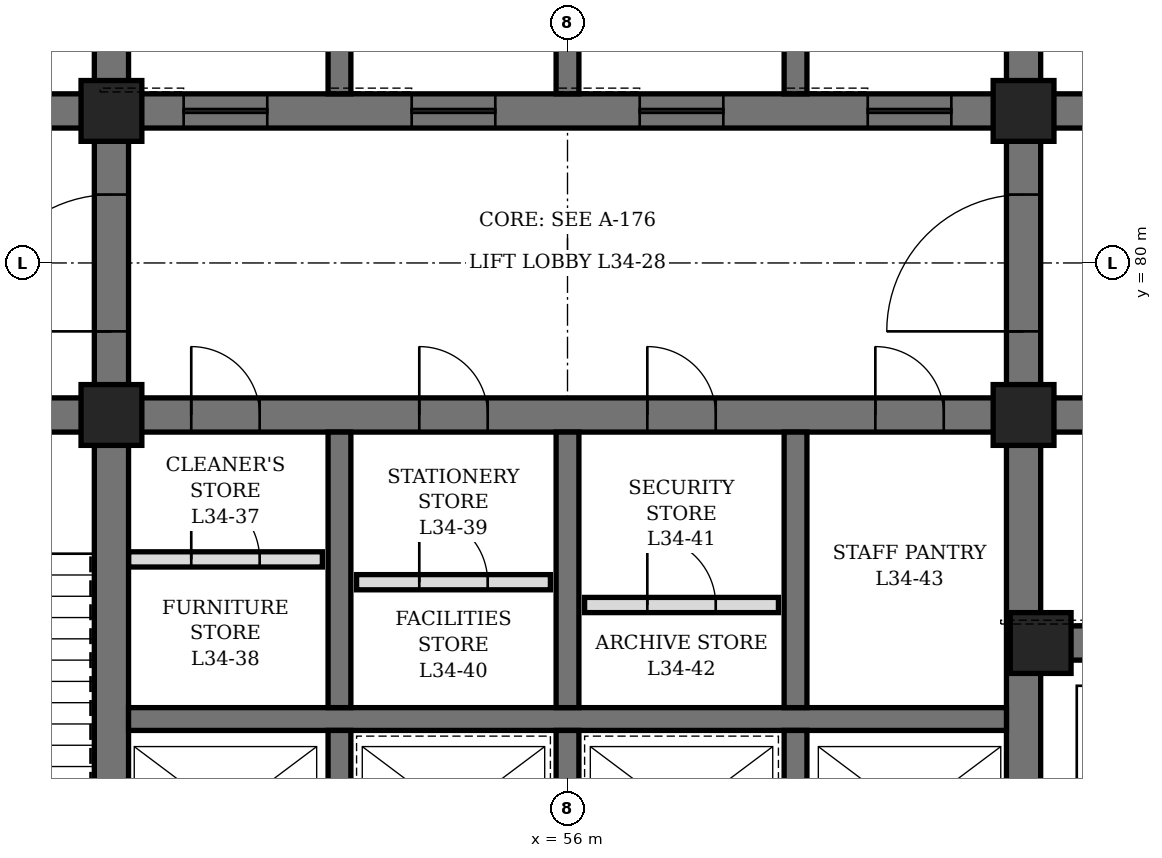
"""IFC4 building model, lengths in metres.
Left out: names, types, materials, properties, quantities, classifications, styles, units other than length and angle.
Written with IfcOpenShell. Run it as: python <this file> out.ifc"""

import sys

from ifc_helpers import new_model, si_unit, direction, frame, frame_2d, origin, origin_2d, place, context, subcontext, project, spatial, rectangle, hollow_rectangle, extrude, element, fill, save


model = new_model("IFC4")
c1 = context("Model", 3, precision=1e-05, world=origin(), true_north=direction((0.0, 1.0)))
c2 = subcontext(c1, "Body", "Model", "MODEL_VIEW")
j1 = project(units=[si_unit("LENGTHUNIT", "METRE"), si_unit("PLANEANGLEUNIT", "RADIAN")], contexts=[c1])
p1 = place(None, origin())
s1 = spatial("IfcSite", under=j1, at=p1, CompositionType="ELEMENT")
p2 = place(p1, origin())
s2 = spatial("IfcBuilding", under=s1, at=p2, CompositionType="ELEMENT")
p3 = place(p2, frame((0.0, 0.0, 154.3)))
s3 = spatial("IfcBuildingStorey", under=s2, at=p3, CompositionType="ELEMENT", Elevation=154.3)
p4 = place(p3, frame((50.0, 71.6, 0.0), z_axis=(0.0, 0.0, 1.0), x_axis=(0.0, 1.0, 0.0)))
e1 = element("IfcWall", 1, at=p4, inside=s3, PredefinedType="SHEAR", context=c2, shape_type="SweptSolid", body=[
    extrude(rectangle(XDim=16.8, YDim=0.45, at=frame_2d((8.4, 0.0))), origin(), (0.0, 0.0, 1.0), 4.2),
])
p5 = place(p4, frame((7.5, 0.0, 0.0)))
e2 = element("IfcOpeningElement", 2, at=p5, cuts=e1, PredefinedType="OPENING", context=c2, shape_type="SweptSolid", body=[
    extrude(rectangle(XDim=1.8, YDim=2.4, at=frame_2d((0.9, 1.2))), frame((0.0, 0.235, 0.0), z_axis=(0.0, -1.0, 0.0), x_axis=(1.0, 0.0, 0.0)), (0.0, 0.0, 1.0), 0.47),
])
p6 = place(p3, frame((62.0, 71.6, 0.0), z_axis=(0.0, 0.0, 1.0), x_axis=(0.0, 1.0, 0.0)))
e3 = element("IfcWall", 3, at=p6, inside=s3, PredefinedType="SHEAR", context=c2, shape_type="SweptSolid", body=[
    extrude(rectangle(XDim=16.8, YDim=0.45, at=frame_2d((8.4, 0.0))), origin(), (0.0, 0.0, 1.0), 4.2),
])
p7 = place(p6, frame((7.5, 0.0, 0.0)))
e4 = element("IfcOpeningElement", 4, at=p7, cuts=e3, PredefinedType="OPENING", context=c2, shape_type="SweptSolid", body=[
    extrude(rectangle(XDim=1.8, YDim=2.4, at=frame_2d((0.9, 1.2))), frame((0.0, 0.235, 0.0), z_axis=(0.0, -1.0, 0.0), x_axis=(1.0, 0.0, 0.0)), (0.0, 0.0, 1.0), 0.47),
])
p8 = place(p3, frame((44.6, 78.0, 0.0), z_axis=(0.0, 0.0, 1.0), x_axis=(1.0, 0.0, 0.0)))
e5 = element("IfcWall", 5, at=p8, inside=s3, PredefinedType="SHEAR", context=c2, shape_type="SweptSolid", body=[
    extrude(rectangle(XDim=5.175, YDim=0.45, at=frame_2d((2.587, 0.0))), origin(), (0.0, 0.0, 1.0), 4.2),
])
p9 = place(p8, frame((1.8, 0.0, 0.0)))
e6 = element("IfcOpeningElement", 6, at=p9, cuts=e5, PredefinedType="OPENING", context=c2, shape_type="SweptSolid", body=[
    extrude(rectangle(XDim=1.2, YDim=2.1, at=frame_2d((0.6, 1.05))), frame((0.0, 0.235, 0.0), z_axis=(0.0, -1.0, 0.0), x_axis=(1.0, 0.0, 0.0)), (0.0, 0.0, 1.0), 0.47),
])
p10 = place(p3, frame((44.6, 82.0, 0.0), z_axis=(0.0, 0.0, 1.0), x_axis=(1.0, 0.0, 0.0)))
e7 = element("IfcWall", 7, at=p10, inside=s3, PredefinedType="SHEAR", context=c2, shape_type="SweptSolid", body=[
    extrude(rectangle(XDim=5.175, YDim=0.45, at=frame_2d((2.587, 0.0))), origin(), (0.0, 0.0, 1.0), 4.2),
])
p11 = place(p10, frame((0.7, 0.0, 0.0)))
e8 = element("IfcOpeningElement", 8, at=p11, cuts=e7, PredefinedType="OPENING", context=c2, shape_type="SweptSolid", body=[
    extrude(rectangle(XDim=0.9, YDim=2.1, at=frame_2d((0.45, 1.05))), frame((0.0, 0.235, 0.0), z_axis=(0.0, -1.0, 0.0), x_axis=(1.0, 0.0, 0.0)), (0.0, 0.0, 1.0), 0.47),
])
p12 = place(p3, frame((62.225, 75.0, 0.0), z_axis=(0.0, 0.0, 1.0), x_axis=(1.0, 0.0, 0.0)))
e9 = element("IfcWall", 9, at=p12, inside=s3, PredefinedType="SHEAR", context=c2, shape_type="SweptSolid", body=[
    extrude(rectangle(XDim=5.175, YDim=0.45, at=frame_2d((2.587, 0.0))), origin(), (0.0, 0.0, 1.0), 4.2),
])
p13 = place(p12, frame((0.675, 0.0, 0.0)))
e10 = element("IfcOpeningElement", 10, at=p13, cuts=e9, PredefinedType="OPENING", context=c2, shape_type="SweptSolid", body=[
    extrude(rectangle(XDim=1.2, YDim=2.2, at=frame_2d((0.6, 1.1))), frame((0.0, 0.235, 0.0), z_axis=(0.0, -1.0, 0.0), x_axis=(1.0, 0.0, 0.0)), (0.0, 0.0, 1.0), 0.47),
])
p14 = place(p12, frame((3.425, 0.0, 0.0)))
e11 = element("IfcOpeningElement", 11, at=p14, cuts=e9, PredefinedType="OPENING", context=c2, shape_type="SweptSolid", body=[
    extrude(rectangle(XDim=1.2, YDim=2.2, at=frame_2d((0.6, 1.1))), frame((0.0, 0.235, 0.0), z_axis=(0.0, -1.0, 0.0), x_axis=(1.0, 0.0, 0.0)), (0.0, 0.0, 1.0), 0.47),
])
p15 = place(p3, frame((62.225, 78.0, 0.0), z_axis=(0.0, 0.0, 1.0), x_axis=(1.0, 0.0, 0.0)))
e12 = element("IfcWall", 12, at=p15, inside=s3, PredefinedType="SHEAR", context=c2, shape_type="SweptSolid", body=[
    extrude(rectangle(XDim=5.175, YDim=0.45, at=frame_2d((2.587, 0.0))), origin(), (0.0, 0.0, 1.0), 4.2),
])
p16 = place(p15, frame((2.175, 0.0, 0.0)))
e13 = element("IfcOpeningElement", 13, at=p16, cuts=e12, PredefinedType="OPENING", context=c2, shape_type="SweptSolid", body=[
    extrude(rectangle(XDim=1.2, YDim=2.1, at=frame_2d((0.6, 1.05))), frame((0.0, 0.235, 0.0), z_axis=(0.0, -1.0, 0.0), x_axis=(1.0, 0.0, 0.0)), (0.0, 0.0, 1.0), 0.47),
])
p17 = place(p3, frame((62.225, 82.0, 0.0), z_axis=(0.0, 0.0, 1.0), x_axis=(1.0, 0.0, 0.0)))
e14 = element("IfcWall", 14, at=p17, inside=s3, PredefinedType="SHEAR", context=c2, shape_type="SweptSolid", body=[
    extrude(rectangle(XDim=5.175, YDim=0.45, at=frame_2d((2.587, 0.0))), origin(), (0.0, 0.0, 1.0), 4.2),
])
p18 = place(p17, frame((2.175, 0.0, 0.0)))
e15 = element("IfcOpeningElement", 15, at=p18, cuts=e14, PredefinedType="OPENING", context=c2, shape_type="SweptSolid", body=[
    extrude(rectangle(XDim=1.2, YDim=2.1, at=frame_2d((0.6, 1.05))), frame((0.0, 0.235, 0.0), z_axis=(0.0, -1.0, 0.0), x_axis=(1.0, 0.0, 0.0)), (0.0, 0.0, 1.0), 0.47),
])
p19 = place(p3, frame((50.225, 78.0, 0.0), z_axis=(0.0, 0.0, 1.0), x_axis=(1.0, 0.0, 0.0)))
e16 = element("IfcWall", 16, at=p19, inside=s3, PredefinedType="SHEAR", context=c2, shape_type="SweptSolid", body=[
    extrude(rectangle(XDim=11.55, YDim=0.45, at=frame_2d((5.775, 0.0))), origin(), (0.0, 0.0, 1.0), 4.2),
])
p20 = place(p19, frame((0.825, 0.0, 0.0)))
e17 = element("IfcOpeningElement", 17, at=p20, cuts=e16, PredefinedType="OPENING", context=c2, shape_type="SweptSolid", body=[
    extrude(rectangle(XDim=0.9, YDim=2.1, at=frame_2d((0.45, 1.05))), frame((0.0, 0.235, 0.0), z_axis=(0.0, -1.0, 0.0), x_axis=(1.0, 0.0, 0.0)), (0.0, 0.0, 1.0), 0.47),
])
p21 = place(p19, frame((3.825, 0.0, 0.0)))
e18 = element("IfcOpeningElement", 18, at=p21, cuts=e16, PredefinedType="OPENING", context=c2, shape_type="SweptSolid", body=[
    extrude(rectangle(XDim=0.9, YDim=2.1, at=frame_2d((0.45, 1.05))), frame((0.0, 0.235, 0.0), z_axis=(0.0, -1.0, 0.0), x_axis=(1.0, 0.0, 0.0)), (0.0, 0.0, 1.0), 0.47),
])
p22 = place(p19, frame((6.825, 0.0, 0.0)))
e19 = element("IfcOpeningElement", 19, at=p22, cuts=e16, PredefinedType="OPENING", context=c2, shape_type="SweptSolid", body=[
    extrude(rectangle(XDim=0.9, YDim=2.1, at=frame_2d((0.45, 1.05))), frame((0.0, 0.235, 0.0), z_axis=(0.0, -1.0, 0.0), x_axis=(1.0, 0.0, 0.0)), (0.0, 0.0, 1.0), 0.47),
])
p23 = place(p19, frame((9.825, 0.0, 0.0)))
e20 = element("IfcOpeningElement", 20, at=p23, cuts=e16, PredefinedType="OPENING", context=c2, shape_type="SweptSolid", body=[
    extrude(rectangle(XDim=0.9, YDim=2.1, at=frame_2d((0.45, 1.05))), frame((0.0, 0.235, 0.0), z_axis=(0.0, -1.0, 0.0), x_axis=(1.0, 0.0, 0.0)), (0.0, 0.0, 1.0), 0.47),
])
p24 = place(p3, frame((50.225, 82.0, 0.0), z_axis=(0.0, 0.0, 1.0), x_axis=(1.0, 0.0, 0.0)))
e21 = element("IfcWall", 21, at=p24, inside=s3, PredefinedType="SHEAR", context=c2, shape_type="SweptSolid", body=[
    extrude(rectangle(XDim=11.55, YDim=0.45, at=frame_2d((5.775, 0.0))), origin(), (0.0, 0.0, 1.0), 4.2),
])
p25 = place(p24, frame((0.725, 0.0, 0.0)))
e22 = element("IfcOpeningElement", 22, at=p25, cuts=e21, PredefinedType="OPENING", context=c2, shape_type="SweptSolid", body=[
    extrude(rectangle(XDim=1.1, YDim=2.2, at=frame_2d((0.55, 1.1))), frame((0.0, 0.235, 0.0), z_axis=(0.0, -1.0, 0.0), x_axis=(1.0, 0.0, 0.0)), (0.0, 0.0, 1.0), 0.47),
])
p26 = place(p24, frame((3.725, 0.0, 0.0)))
e23 = element("IfcOpeningElement", 23, at=p26, cuts=e21, PredefinedType="OPENING", context=c2, shape_type="SweptSolid", body=[
    extrude(rectangle(XDim=1.1, YDim=2.2, at=frame_2d((0.55, 1.1))), frame((0.0, 0.235, 0.0), z_axis=(0.0, -1.0, 0.0), x_axis=(1.0, 0.0, 0.0)), (0.0, 0.0, 1.0), 0.47),
])
p27 = place(p24, frame((6.725, 0.0, 0.0)))
e24 = element("IfcOpeningElement", 24, at=p27, cuts=e21, PredefinedType="OPENING", context=c2, shape_type="SweptSolid", body=[
    extrude(rectangle(XDim=1.1, YDim=2.2, at=frame_2d((0.55, 1.1))), frame((0.0, 0.235, 0.0), z_axis=(0.0, -1.0, 0.0), x_axis=(1.0, 0.0, 0.0)), (0.0, 0.0, 1.0), 0.47),
])
p28 = place(p24, frame((9.725, 0.0, 0.0)))
e25 = element("IfcOpeningElement", 25, at=p28, cuts=e21, PredefinedType="OPENING", context=c2, shape_type="SweptSolid", body=[
    extrude(rectangle(XDim=1.1, YDim=2.2, at=frame_2d((0.55, 1.1))), frame((0.0, 0.235, 0.0), z_axis=(0.0, -1.0, 0.0), x_axis=(1.0, 0.0, 0.0)), (0.0, 0.0, 1.0), 0.47),
])
p29 = place(p3, frame((50.225, 74.0, 0.0), z_axis=(0.0, 0.0, 1.0), x_axis=(1.0, 0.0, 0.0)))
e26 = element("IfcWall", 26, at=p29, inside=s3, PredefinedType="SHEAR", context=c2, shape_type="SweptSolid", body=[
    extrude(rectangle(XDim=11.55, YDim=0.3, at=frame_2d((5.775, 0.0))), origin(), (0.0, 0.0, 1.0), 4.2),
])
p30 = place(p3, frame((53.0, 71.6, 0.0), z_axis=(0.0, 0.0, 1.0), x_axis=(0.0, 1.0, 0.0)))
e27 = element("IfcWall", 27, at=p30, inside=s3, PredefinedType="SHEAR", context=c2, shape_type="SweptSolid", body=[
    extrude(rectangle(XDim=2.25, YDim=0.3, at=frame_2d((1.125, 0.0))), origin(), (0.0, 0.0, 1.0), 4.2),
])
p31 = place(p3, frame((53.0, 74.15, 0.0), z_axis=(0.0, 0.0, 1.0), x_axis=(0.0, 1.0, 0.0)))
e28 = element("IfcWall", 28, at=p31, inside=s3, PredefinedType="SHEAR", context=c2, shape_type="SweptSolid", body=[
    extrude(rectangle(XDim=3.625, YDim=0.3, at=frame_2d((1.812, 0.0))), origin(), (0.0, 0.0, 1.0), 4.2),
])
p32 = place(p3, frame((53.0, 82.225, 0.0), z_axis=(0.0, 0.0, 1.0), x_axis=(0.0, 1.0, 0.0)))
e29 = element("IfcWall", 29, at=p32, inside=s3, PredefinedType="SHEAR", context=c2, shape_type="SweptSolid", body=[
    extrude(rectangle(XDim=3.55, YDim=0.3, at=frame_2d((1.775, 0.0))), origin(), (0.0, 0.0, 1.0), 4.2),
])
p33 = place(p3, frame((56.0, 71.6, 0.0), z_axis=(0.0, 0.0, 1.0), x_axis=(0.0, 1.0, 0.0)))
e30 = element("IfcWall", 30, at=p33, inside=s3, PredefinedType="SHEAR", context=c2, shape_type="SweptSolid", body=[
    extrude(rectangle(XDim=2.25, YDim=0.3, at=frame_2d((1.125, 0.0))), origin(), (0.0, 0.0, 1.0), 4.2),
])
p34 = place(p3, frame((56.0, 74.15, 0.0), z_axis=(0.0, 0.0, 1.0), x_axis=(0.0, 1.0, 0.0)))
e31 = element("IfcWall", 31, at=p34, inside=s3, PredefinedType="SHEAR", context=c2, shape_type="SweptSolid", body=[
    extrude(rectangle(XDim=3.625, YDim=0.3, at=frame_2d((1.812, 0.0))), origin(), (0.0, 0.0, 1.0), 4.2),
])
p35 = place(p3, frame((56.0, 82.225, 0.0), z_axis=(0.0, 0.0, 1.0), x_axis=(0.0, 1.0, 0.0)))
e32 = element("IfcWall", 32, at=p35, inside=s3, PredefinedType="SHEAR", context=c2, shape_type="SweptSolid", body=[
    extrude(rectangle(XDim=3.55, YDim=0.3, at=frame_2d((1.775, 0.0))), origin(), (0.0, 0.0, 1.0), 4.2),
])
p36 = place(p3, frame((59.0, 71.6, 0.0), z_axis=(0.0, 0.0, 1.0), x_axis=(0.0, 1.0, 0.0)))
e33 = element("IfcWall", 33, at=p36, inside=s3, PredefinedType="SHEAR", context=c2, shape_type="SweptSolid", body=[
    extrude(rectangle(XDim=2.25, YDim=0.3, at=frame_2d((1.125, 0.0))), origin(), (0.0, 0.0, 1.0), 4.2),
])
p37 = place(p3, frame((59.0, 74.15, 0.0), z_axis=(0.0, 0.0, 1.0), x_axis=(0.0, 1.0, 0.0)))
e34 = element("IfcWall", 34, at=p37, inside=s3, PredefinedType="SHEAR", context=c2, shape_type="SweptSolid", body=[
    extrude(rectangle(XDim=3.625, YDim=0.3, at=frame_2d((1.812, 0.0))), origin(), (0.0, 0.0, 1.0), 4.2),
])
p38 = place(p3, frame((59.0, 82.225, 0.0), z_axis=(0.0, 0.0, 1.0), x_axis=(0.0, 1.0, 0.0)))
e35 = element("IfcWall", 35, at=p38, inside=s3, PredefinedType="SHEAR", context=c2, shape_type="SweptSolid", body=[
    extrude(rectangle(XDim=3.55, YDim=0.3, at=frame_2d((1.775, 0.0))), origin(), (0.0, 0.0, 1.0), 4.2),
])
for number, where, z_axis, x_axis in (
    (36, (50.0, 78.0, 0.0), (0.0, 0.0, 1.0), (1.0, 0.0, 0.0)),
    (37, (50.0, 82.0, 0.0), (0.0, 0.0, 1.0), (1.0, 0.0, 0.0)),
    (38, (62.0, 78.0, 0.0), (0.0, 0.0, 1.0), (1.0, 0.0, 0.0)),
    (39, (62.0, 82.0, 0.0), (0.0, 0.0, 1.0), (1.0, 0.0, 0.0)),
    (40, (62.225, 75.0, 0.0), (0.0, 0.0, 1.0), (1.0, 0.0, 0.0)),
):
    element("IfcColumn", number, at=place(p3, frame(where, z_axis=z_axis, x_axis=x_axis)), inside=s3, PredefinedType="COLUMN", context=c2, shape_type="SweptSolid", body=[
        extrude(hollow_rectangle(XDim=0.8, YDim=0.8, WallThickness=0.1, at=origin_2d()), origin(), (0.0, 0.0, 1.0), 4.2),
    ])
p39 = place(p3, frame((50.225, 76.1, 0.0), z_axis=(0.0, 0.0, 1.0), x_axis=(1.0, 0.0, 0.0)))
e41 = element("IfcWall", 41, at=p39, inside=s3, PredefinedType="PARTITIONING", context=c2, shape_type="SweptSolid", body=[
    extrude(rectangle(XDim=2.55, YDim=0.2, at=frame_2d((1.275, 0.0))), origin(), (0.0, 0.0, 1.0), 4.04),
])
p40 = place(p39, frame((0.825, 0.0, 0.0)))
e42 = element("IfcOpeningElement", 42, at=p40, cuts=e41, PredefinedType="OPENING", context=c2, shape_type="SweptSolid", body=[
    extrude(rectangle(XDim=0.9, YDim=2.1, at=frame_2d((0.45, 1.05))), frame((0.0, 0.11, 0.0), z_axis=(0.0, -1.0, 0.0), x_axis=(1.0, 0.0, 0.0)), (0.0, 0.0, 1.0), 0.22),
])
p41 = place(p3, frame((53.225, 75.8, 0.0), z_axis=(0.0, 0.0, 1.0), x_axis=(1.0, 0.0, 0.0)))
e43 = element("IfcWall", 43, at=p41, inside=s3, PredefinedType="PARTITIONING", context=c2, shape_type="SweptSolid", body=[
    extrude(rectangle(XDim=2.55, YDim=0.2, at=frame_2d((1.275, 0.0))), origin(), (0.0, 0.0, 1.0), 4.04),
])
p42 = place(p41, frame((0.825, 0.0, 0.0)))
e44 = element("IfcOpeningElement", 44, at=p42, cuts=e43, PredefinedType="OPENING", context=c2, shape_type="SweptSolid", body=[
    extrude(rectangle(XDim=0.9, YDim=2.1, at=frame_2d((0.45, 1.05))), frame((0.0, 0.11, 0.0), z_axis=(0.0, -1.0, 0.0), x_axis=(1.0, 0.0, 0.0)), (0.0, 0.0, 1.0), 0.22),
])
p43 = place(p3, frame((56.225, 75.5, 0.0), z_axis=(0.0, 0.0, 1.0), x_axis=(1.0, 0.0, 0.0)))
e45 = element("IfcWall", 45, at=p43, inside=s3, PredefinedType="PARTITIONING", context=c2, shape_type="SweptSolid", body=[
    extrude(rectangle(XDim=2.55, YDim=0.2, at=frame_2d((1.275, 0.0))), origin(), (0.0, 0.0, 1.0), 4.04),
])
p44 = place(p43, frame((0.825, 0.0, 0.0)))
e46 = element("IfcOpeningElement", 46, at=p44, cuts=e45, PredefinedType="OPENING", context=c2, shape_type="SweptSolid", body=[
    extrude(rectangle(XDim=0.9, YDim=2.1, at=frame_2d((0.45, 1.05))), frame((0.0, 0.11, 0.0), z_axis=(0.0, -1.0, 0.0), x_axis=(1.0, 0.0, 0.0)), (0.0, 0.0, 1.0), 0.22),
])
p45 = place(p20, origin())
e47 = element("IfcDoor", 47, at=p45, inside=s3, OperationType="SINGLE_SWING_LEFT", PredefinedType="DOOR", context=c2, shape_type="SweptSolid", body=[
    extrude(rectangle(XDim=0.9, YDim=2.1, at=frame_2d((0.45, 1.05))), frame((0.0, 0.225, 0.0), z_axis=(0.0, -1.0, 0.0), x_axis=(1.0, 0.0, 0.0)), (0.0, 0.0, 1.0), 0.449),
])
fill(e17, e47)
p46 = place(p40, origin())
e48 = element("IfcDoor", 48, at=p46, inside=s3, OperationType="SINGLE_SWING_LEFT", PredefinedType="DOOR", context=c2, shape_type="SweptSolid", body=[
    extrude(rectangle(XDim=0.9, YDim=2.1, at=frame_2d((0.45, 1.05))), frame((0.0, 0.1, 0.0), z_axis=(0.0, -1.0, 0.0), x_axis=(1.0, 0.0, 0.0)), (0.0, 0.0, 1.0), 0.199),
])
fill(e42, e48)
p47 = place(p21, origin())
e49 = element("IfcDoor", 49, at=p47, inside=s3, OperationType="SINGLE_SWING_LEFT", PredefinedType="DOOR", context=c2, shape_type="SweptSolid", body=[
    extrude(rectangle(XDim=0.9, YDim=2.1, at=frame_2d((0.45, 1.05))), frame((0.0, 0.225, 0.0), z_axis=(0.0, -1.0, 0.0), x_axis=(1.0, 0.0, 0.0)), (0.0, 0.0, 1.0), 0.449),
])
fill(e18, e49)
p48 = place(p42, origin())
e50 = element("IfcDoor", 50, at=p48, inside=s3, OperationType="SINGLE_SWING_LEFT", PredefinedType="DOOR", context=c2, shape_type="SweptSolid", body=[
    extrude(rectangle(XDim=0.9, YDim=2.1, at=frame_2d((0.45, 1.05))), frame((0.0, 0.1, 0.0), z_axis=(0.0, -1.0, 0.0), x_axis=(1.0, 0.0, 0.0)), (0.0, 0.0, 1.0), 0.199),
])
fill(e44, e50)
p49 = place(p22, origin())
e51 = element("IfcDoor", 51, at=p49, inside=s3, OperationType="SINGLE_SWING_LEFT", PredefinedType="DOOR", context=c2, shape_type="SweptSolid", body=[
    extrude(rectangle(XDim=0.9, YDim=2.1, at=frame_2d((0.45, 1.05))), frame((0.0, 0.225, 0.0), z_axis=(0.0, -1.0, 0.0), x_axis=(1.0, 0.0, 0.0)), (0.0, 0.0, 1.0), 0.449),
])
fill(e19, e51)
p50 = place(p44, origin())
e52 = element("IfcDoor", 52, at=p50, inside=s3, OperationType="SINGLE_SWING_LEFT", PredefinedType="DOOR", context=c2, shape_type="SweptSolid", body=[
    extrude(rectangle(XDim=0.9, YDim=2.1, at=frame_2d((0.45, 1.05))), frame((0.0, 0.1, 0.0), z_axis=(0.0, -1.0, 0.0), x_axis=(1.0, 0.0, 0.0)), (0.0, 0.0, 1.0), 0.199),
])
fill(e46, e52)
p51 = place(p23, origin())
e53 = element("IfcDoor", 53, at=p51, inside=s3, OperationType="SINGLE_SWING_LEFT", PredefinedType="DOOR", context=c2, shape_type="SweptSolid", body=[
    extrude(rectangle(XDim=0.9, YDim=2.1, at=frame_2d((0.45, 1.05))), frame((0.0, 0.225, 0.0), z_axis=(0.0, -1.0, 0.0), x_axis=(1.0, 0.0, 0.0)), (0.0, 0.0, 1.0), 0.449),
])
fill(e20, e53)
p52 = place(p5, origin())
e54 = element("IfcDoor", 54, at=p52, inside=s3, OperationType="DOUBLE_DOOR_SINGLE_SWING", PredefinedType="DOOR", context=c2, shape_type="SweptSolid", body=[
    extrude(rectangle(XDim=1.8, YDim=2.4, at=frame_2d((0.9, 1.2))), frame((0.0, 0.225, 0.0), z_axis=(0.0, -1.0, 0.0), x_axis=(1.0, 0.0, 0.0)), (0.0, 0.0, 1.0), 0.449),
])
fill(e2, e54)
p53 = place(p7, origin())
e55 = element("IfcDoor", 55, at=p53, inside=s3, OperationType="DOUBLE_DOOR_SINGLE_SWING", PredefinedType="DOOR", context=c2, shape_type="SweptSolid", body=[
    extrude(rectangle(XDim=1.8, YDim=2.4, at=frame_2d((0.9, 1.2))), frame((0.0, 0.225, 0.0), z_axis=(0.0, -1.0, 0.0), x_axis=(1.0, 0.0, 0.0)), (0.0, 0.0, 1.0), 0.449),
])
fill(e4, e55)
p54 = place(p25, origin())
e56 = element("IfcDoor", 56, at=p54, inside=s3, OperationType="SLIDING_TO_LEFT", PredefinedType="DOOR", context=c2, shape_type="SweptSolid", body=[
    extrude(rectangle(XDim=1.1, YDim=2.2, at=frame_2d((0.55, 1.1))), frame((0.0, 0.225, 0.0), z_axis=(0.0, -1.0, 0.0), x_axis=(1.0, 0.0, 0.0)), (0.0, 0.0, 1.0), 0.449),
])
fill(e22, e56)
p55 = place(p26, origin())
e57 = element("IfcDoor", 57, at=p55, inside=s3, OperationType="SLIDING_TO_LEFT", PredefinedType="DOOR", context=c2, shape_type="SweptSolid", body=[
    extrude(rectangle(XDim=1.1, YDim=2.2, at=frame_2d((0.55, 1.1))), frame((0.0, 0.225, 0.0), z_axis=(0.0, -1.0, 0.0), x_axis=(1.0, 0.0, 0.0)), (0.0, 0.0, 1.0), 0.449),
])
fill(e23, e57)
p56 = place(p27, origin())
e58 = element("IfcDoor", 58, at=p56, inside=s3, OperationType="SLIDING_TO_LEFT", PredefinedType="DOOR", context=c2, shape_type="SweptSolid", body=[
    extrude(rectangle(XDim=1.1, YDim=2.2, at=frame_2d((0.55, 1.1))), frame((0.0, 0.225, 0.0), z_axis=(0.0, -1.0, 0.0), x_axis=(1.0, 0.0, 0.0)), (0.0, 0.0, 1.0), 0.449),
])
fill(e24, e58)
p57 = place(p28, origin())
e59 = element("IfcDoor", 59, at=p57, inside=s3, OperationType="SLIDING_TO_LEFT", PredefinedType="DOOR", context=c2, shape_type="SweptSolid", body=[
    extrude(rectangle(XDim=1.1, YDim=2.2, at=frame_2d((0.55, 1.1))), frame((0.0, 0.225, 0.0), z_axis=(0.0, -1.0, 0.0), x_axis=(1.0, 0.0, 0.0)), (0.0, 0.0, 1.0), 0.449),
])
fill(e25, e59)
save(model, sys.argv[1])
